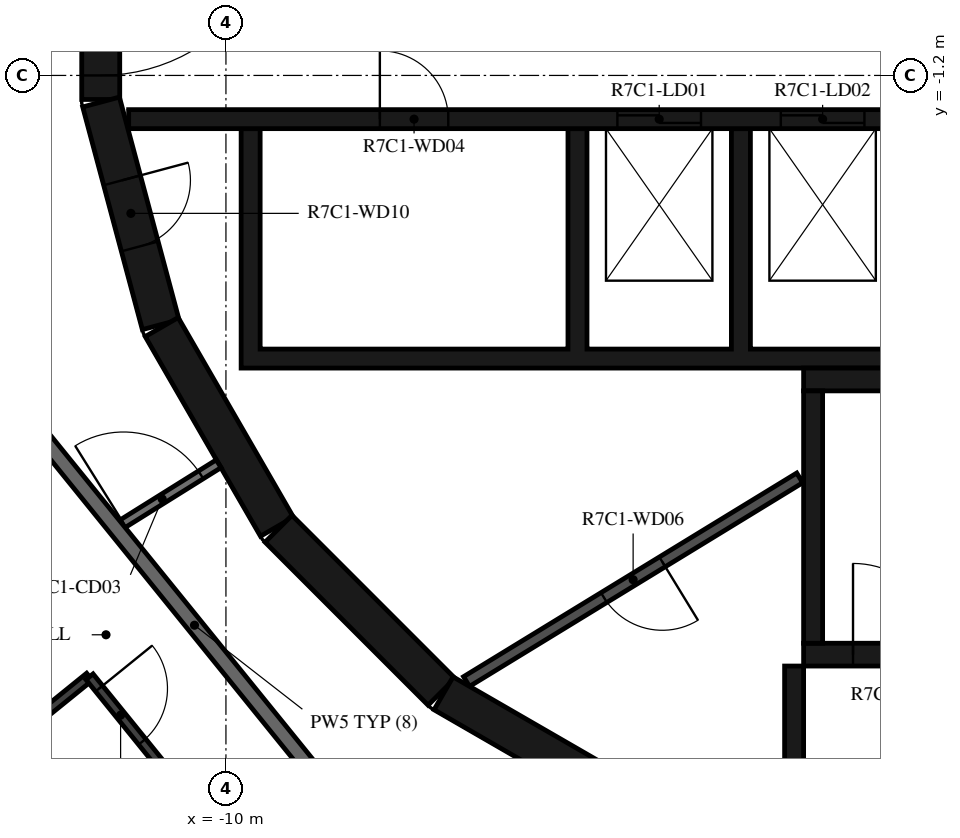
"""IFC4 building model, lengths in metres.
Left out: names, types, materials, properties, quantities, classifications, styles, units other than length and angle.
Written with IfcOpenShell. Run it as: python <this file> out.ifc"""

import sys

from ifc_helpers import new_model, si_unit, direction, frame, frame_2d, origin, place, context, subcontext, project, spatial, polyline, rectangle, outline, extrude, element, fill, save


model = new_model("IFC4")
c1 = context("Model", 3, precision=1e-05, world=origin(), true_north=direction((0.0, 1.0)))
c2 = subcontext(c1, "Body", "Model", "MODEL_VIEW")
j1 = project(units=[si_unit("LENGTHUNIT", "METRE"), si_unit("PLANEANGLEUNIT", "RADIAN")], contexts=[c1])
p1 = place(None, origin())
s1 = spatial("IfcSite", under=j1, at=p1, CompositionType="ELEMENT")
p2 = place(p1, origin())
s2 = spatial("IfcBuilding", under=s1, at=p2, CompositionType="ELEMENT")
p3 = place(p2, frame((0.0, 0.0, 287.9)))
s3 = spatial("IfcBuildingStorey", under=s2, at=p3, CompositionType="ELEMENT", Elevation=287.9)
p4 = place(p3, frame((-11.647, 1.516, 0.0), z_axis=(0.0, 0.0, 1.0), x_axis=(0.0, -1.0, 0.0)))
e1 = element("IfcWall", 1, at=p4, inside=s3, PredefinedType="SHEAR", context=c2, shape_type="SweptSolid", body=[
    extrude(rectangle(XDim=3.033, YDim=0.5, at=frame_2d((1.516, 0.0))), origin(), (0.0, 0.0, 1.0), 3.05),
])
p5 = place(p4, frame((0.316, 0.0, 0.0)))
e2 = element("IfcOpeningElement", 2, at=p5, cuts=e1, PredefinedType="OPENING", context=c2, shape_type="SweptSolid", body=[
    extrude(rectangle(XDim=2.4, YDim=2.1, at=frame_2d((1.2, 1.05))), frame((0.0, 0.26, 0.0), z_axis=(0.0, -1.0, 0.0), x_axis=(1.0, 0.0, 0.0)), (0.0, 0.0, 1.0), 0.52),
])
p6 = place(p3, frame((-11.643, -1.55, 0.0), z_axis=(0.0, 0.0, 1.0), x_axis=(0.258734743916, -0.965948410781, 0.0)))
e3 = element("IfcWall", 3, at=p6, inside=s3, PredefinedType="SHEAR", context=c2, shape_type="SweptSolid", body=[
    extrude(rectangle(XDim=3.033, YDim=0.5, at=frame_2d((1.516, 0.0))), origin(), (0.0, 0.0, 1.0), 3.05),
])
p7 = place(p6, frame((1.066, 0.0, 0.0)))
e4 = element("IfcOpeningElement", 4, at=p7, cuts=e3, PredefinedType="OPENING", context=c2, shape_type="SweptSolid", body=[
    extrude(rectangle(XDim=0.9, YDim=2.1, at=frame_2d((0.45, 1.05))), frame((0.0, 0.26, 0.0), z_axis=(0.0, -1.0, 0.0), x_axis=(1.0, 0.0, 0.0)), (0.0, 0.0, 1.0), 0.52),
])
p8 = place(p3, frame((-10.845, -4.51, 0.0), z_axis=(0.0, 0.0, 1.0), x_axis=(0.500087131594, -0.865975092491, 0.0)))
e5 = element("IfcWall", 5, at=p8, inside=s3, PredefinedType="SHEAR", context=c2, shape_type="SweptSolid", body=[
    extrude(rectangle(XDim=3.033, YDim=0.5, at=frame_2d((1.516, 0.0))), origin(), (0.0, 0.0, 1.0), 3.05),
])
p9 = place(p3, frame((-9.308, -7.164, 0.0), z_axis=(0.0, 0.0, 1.0), x_axis=(0.707106781187, -0.707106781187, 0.0)))
e6 = element("IfcWall", 6, at=p9, inside=s3, PredefinedType="SHEAR", context=c2, shape_type="SweptSolid", body=[
    extrude(rectangle(XDim=3.032, YDim=0.5, at=frame_2d((1.516, 0.0))), origin(), (0.0, 0.0, 1.0), 3.05),
])
p10 = place(p3, frame((-7.137, -9.329, 0.0), z_axis=(0.0, 0.0, 1.0), x_axis=(0.865975092491, -0.500087131594, 0.0)))
e7 = element("IfcWall", 7, at=p10, inside=s3, PredefinedType="SHEAR", context=c2, shape_type="SweptSolid", body=[
    extrude(rectangle(XDim=3.033, YDim=0.5, at=frame_2d((1.516, 0.0))), origin(), (0.0, 0.0, 1.0), 3.05),
])
p11 = place(p3, frame((-2.275, -8.67, 0.0), z_axis=(0.0, 0.0, 1.0), x_axis=(0.0, 1.0, 0.0)))
e8 = element("IfcWall", 8, at=p11, inside=s3, PredefinedType="SHEAR", context=c2, shape_type="SweptSolid", body=[
    extrude(rectangle(XDim=3.32, YDim=0.25, at=frame_2d((1.66, 0.0))), origin(), (0.0, 0.0, 1.0), 3.05),
])
p12 = place(p3, frame((-2.4, -5.2, 0.0), z_axis=(0.0, 0.0, 1.0), x_axis=(1.0, 0.0, 0.0)))
e9 = element("IfcWall", 9, at=p12, inside=s3, PredefinedType="SHEAR", context=c2, shape_type="SweptSolid", body=[
    extrude(rectangle(XDim=7.05, YDim=0.3, at=frame_2d((3.525, 0.0))), origin(), (0.0, 0.0, 1.0), 3.05),
])
p13 = place(p3, frame((-2.4, -8.82, 0.0), z_axis=(0.0, 0.0, 1.0), x_axis=(1.0, 0.0, 0.0)))
e10 = element("IfcWall", 10, at=p13, inside=s3, PredefinedType="SHEAR", context=c2, shape_type="SweptSolid", body=[
    extrude(rectangle(XDim=2.5, YDim=0.3, at=frame_2d((1.25, 0.0))), origin(), (0.0, 0.0, 1.0), 3.05),
])
p14 = place(p13, frame((0.65, 0.0, 0.0)))
e11 = element("IfcOpeningElement", 11, at=p14, cuts=e10, PredefinedType="OPENING", context=c2, shape_type="SweptSolid", body=[
    extrude(rectangle(XDim=1.2, YDim=2.1, at=frame_2d((0.6, 1.05))), frame((0.0, 0.16, 0.0), z_axis=(0.0, -1.0, 0.0), x_axis=(1.0, 0.0, 0.0)), (0.0, 0.0, 1.0), 0.32),
])
p15 = place(p3, frame((-2.525, -8.97, 0.0), z_axis=(0.0, 0.0, 1.0), x_axis=(0.0, -1.0, 0.0)))
e12 = element("IfcWall", 12, at=p15, inside=s3, PredefinedType="SHEAR", context=c2, shape_type="SweptSolid", body=[
    extrude(rectangle(XDim=2.11, YDim=0.25, at=frame_2d((1.055, 0.0))), origin(), (0.0, 0.0, 1.0), 3.05),
])
p16 = place(p3, origin())
e13 = element("IfcWall", 13, at=p16, inside=s3, PredefinedType="SHEAR", context=c2, shape_type="SweptSolid", body=[
    extrude(outline(polyline([(9.8, -5.05), (9.8, -4.8), (9.8, -1.9), (9.55, -1.9), (9.55, -4.8), (7.65, -4.8), (7.65, -1.9), (7.4, -1.9), (7.4, -4.8), (5.5, -4.8), (5.5, -1.9), (5.25, -1.9), (5.25, -4.8), (3.35, -4.8), (3.35, -1.9), (3.1, -1.9), (3.1, -4.8), (1.2, -4.8), (1.2, -1.9), (0.95, -1.9), (0.95, -4.8), (-0.95, -4.8), (-0.95, -1.9), (-1.2, -1.9), (-1.2, -4.8), (-3.1, -4.8), (-3.1, -1.9), (-3.35, -1.9), (-3.35, -4.8), (-5.25, -4.8), (-5.25, -1.9), (-5.5, -1.9), (-5.5, -4.8), (-9.55, -4.8), (-9.55, -1.9), (-9.8, -1.9), (-9.8, -4.8), (-9.8, -5.05), (9.8, -5.05)])), origin(), (0.0, 0.0, 1.0), 3.05),
])
p17 = place(p3, frame((-11.28, -1.775, 0.0), z_axis=(0.0, 0.0, 1.0), x_axis=(1.0, 0.0, 0.0)))
e14 = element("IfcWall", 14, at=p17, inside=s3, PredefinedType="SHEAR", context=c2, shape_type="SweptSolid", body=[
    extrude(rectangle(XDim=14.38, YDim=0.25, at=frame_2d((7.19, 0.0))), origin(), (0.0, 0.0, 1.0), 3.05),
])
p18 = place(p17, frame((6.43, 0.0, 0.0)))
e15 = element("IfcOpeningElement", 15, at=p18, cuts=e14, PredefinedType="OPENING", context=c2, shape_type="SweptSolid", body=[
    extrude(rectangle(XDim=1.1, YDim=2.1, at=frame_2d((0.55, 1.05))), frame((0.0, 0.135, 0.0), z_axis=(0.0, -1.0, 0.0), x_axis=(1.0, 0.0, 0.0)), (0.0, 0.0, 1.0), 0.27),
])
p19 = place(p17, frame((8.58, 0.0, 0.0)))
e16 = element("IfcOpeningElement", 16, at=p19, cuts=e14, PredefinedType="OPENING", context=c2, shape_type="SweptSolid", body=[
    extrude(rectangle(XDim=1.1, YDim=2.1, at=frame_2d((0.55, 1.05))), frame((0.0, 0.135, 0.0), z_axis=(0.0, -1.0, 0.0), x_axis=(1.0, 0.0, 0.0)), (0.0, 0.0, 1.0), 0.27),
])
p20 = place(p17, frame((10.73, 0.0, 0.0)))
e17 = element("IfcOpeningElement", 17, at=p20, cuts=e14, PredefinedType="OPENING", context=c2, shape_type="SweptSolid", body=[
    extrude(rectangle(XDim=1.1, YDim=2.1, at=frame_2d((0.55, 1.05))), frame((0.0, 0.135, 0.0), z_axis=(0.0, -1.0, 0.0), x_axis=(1.0, 0.0, 0.0)), (0.0, 0.0, 1.0), 0.27),
])
p21 = place(p17, frame((3.305, 0.0, 0.0)))
e18 = element("IfcOpeningElement", 18, at=p21, cuts=e14, PredefinedType="OPENING", context=c2, shape_type="SweptSolid", body=[
    extrude(rectangle(XDim=0.9, YDim=2.1, at=frame_2d((0.45, 1.05))), frame((0.0, 0.135, 0.0), z_axis=(0.0, -1.0, 0.0), x_axis=(1.0, 0.0, 0.0)), (0.0, 0.0, 1.0), 0.27),
])
p22 = place(p17, frame((12.98, 0.0, 0.0)))
e19 = element("IfcOpeningElement", 19, at=p22, cuts=e14, PredefinedType="OPENING", context=c2, shape_type="SweptSolid", body=[
    extrude(rectangle(XDim=0.9, YDim=2.1, at=frame_2d((0.45, 1.05))), frame((0.0, 0.135, 0.0), z_axis=(0.0, -1.0, 0.0), x_axis=(1.0, 0.0, 0.0)), (0.0, 0.0, 1.0), 0.27),
])
p23 = place(p3, frame((-2.451, -6.495, 0.0), z_axis=(0.0, 0.0, 1.0), x_axis=(-0.853250115418, -0.521501908471, 0.0)))
e20 = element("IfcWall", 20, at=p23, inside=s3, PredefinedType="PARTITIONING", context=c2, shape_type="SweptSolid", body=[
    extrude(rectangle(XDim=5.137, YDim=0.15, at=frame_2d((2.569, 0.0))), origin(), (0.0, 0.0, 1.0), 3.05),
])
p24 = place(p23, frame((2.119, 0.0, 0.0)))
e21 = element("IfcOpeningElement", 21, at=p24, cuts=e20, PredefinedType="OPENING", context=c2, shape_type="SweptSolid", body=[
    extrude(rectangle(XDim=0.9, YDim=2.1, at=frame_2d((0.45, 1.05))), frame((0.0, 0.085, 0.0), z_axis=(0.0, -1.0, 0.0), x_axis=(1.0, 0.0, 0.0)), (0.0, 0.0, 1.0), 0.17),
])
p25 = place(p3, frame((-11.449, -7.154, 0.0), z_axis=(0.0, 0.0, 1.0), x_axis=(0.848067047543, 0.529888934468, 0.0)))
e22 = element("IfcWall", 22, at=p25, inside=s3, PredefinedType="PARTITIONING", context=c2, shape_type="SweptSolid", body=[
    extrude(rectangle(XDim=1.596, YDim=0.12, at=frame_2d((0.798, 0.0))), origin(), (0.0, 0.0, 1.0), 3.05),
])
p26 = place(p25, frame((0.12, 0.0, 0.0)))
e23 = element("IfcOpeningElement", 23, at=p26, cuts=e22, PredefinedType="OPENING", context=c2, shape_type="SweptSolid", body=[
    extrude(rectangle(XDim=1.2, YDim=2.1, at=frame_2d((0.6, 1.05))), frame((0.0, 0.07, 0.0), z_axis=(0.0, -1.0, 0.0), x_axis=(1.0, 0.0, 0.0)), (0.0, 0.0, 1.0), 0.14),
])
p27 = place(p3, frame((-12.673, -5.643, 0.0), z_axis=(0.0, 0.0, 1.0), x_axis=(0.629302871585, -0.777160148113, 0.0)))
e24 = element("IfcWall", 24, at=p27, inside=s3, PredefinedType="STANDARD", context=c2, shape_type="SweptSolid", body=[
    extrude(rectangle(XDim=7.181, YDim=0.2, at=frame_2d((3.59, 0.0))), origin(), (0.0, 0.0, 1.0), 3.05),
])
p28 = place(p3, frame((-12.33, -9.544, 0.0), z_axis=(0.0, 0.0, 1.0), x_axis=(0.777046524115, 0.629443166109, 0.0)))
e25 = element("IfcWall", 25, at=p28, inside=s3, PredefinedType="PARTITIONING", context=c2, shape_type="SweptSolid", body=[
    extrude(rectangle(XDim=0.688, YDim=0.12, at=frame_2d((0.344, 0.0))), origin(), (0.0, 0.0, 1.0), 3.05),
])
p29 = place(p3, frame((-11.795, -9.111, 0.0), z_axis=(0.0, 0.0, 1.0), x_axis=(0.62936834401, -0.777107127466, 0.0)))
e26 = element("IfcWall", 26, at=p29, inside=s3, PredefinedType="PARTITIONING", context=c2, shape_type="SweptSolid", body=[
    extrude(rectangle(XDim=4.334, YDim=0.12, at=frame_2d((2.167, 0.0))), origin(), (0.0, 0.0, 1.0), 3.05),
])
p30 = place(p29, frame((0.2, 0.0, 0.0)))
e27 = element("IfcOpeningElement", 27, at=p30, cuts=e26, PredefinedType="OPENING", context=c2, shape_type="SweptSolid", body=[
    extrude(rectangle(XDim=0.9, YDim=2.1, at=frame_2d((0.45, 1.05))), frame((0.0, 0.07, 0.0), z_axis=(0.0, -1.0, 0.0), x_axis=(1.0, 0.0, 0.0)), (0.0, 0.0, 1.0), 0.14),
])
p31 = place(p3, frame((-11.185, -18.213, 0.0), z_axis=(0.0, 0.0, 1.0), x_axis=(-0.15642108221, 0.987690460134, 0.0)))
e28 = element("IfcWall", 28, at=p31, inside=s3, PredefinedType="PARTITIONING", context=c2, shape_type="SweptSolid", body=[
    extrude(rectangle(XDim=9.132, YDim=0.12, at=frame_2d((4.566, 0.0))), origin(), (0.0, 0.0, 1.0), 3.05),
])
p32 = place(p31, frame((1.781, 0.0, 0.0)))
e29 = element("IfcOpeningElement", 29, at=p32, cuts=e28, PredefinedType="OPENING", context=c2, shape_type="SweptSolid", body=[
    extrude(rectangle(XDim=0.9, YDim=2.1, at=frame_2d((0.45, 1.05))), frame((0.0, 0.07, 0.0), z_axis=(0.0, -1.0, 0.0), x_axis=(1.0, 0.0, 0.0)), (0.0, 0.0, 1.0), 0.14),
])
p33 = place(p14, origin())
e30 = element("IfcDoor", 30, at=p33, inside=s3, OperationType="SINGLE_SWING_LEFT", PredefinedType="DOOR", context=c2, shape_type="SweptSolid", body=[
    extrude(rectangle(XDim=1.2, YDim=2.1, at=frame_2d((0.6, 1.05))), frame((0.0, 0.025, 0.0), z_axis=(0.0, -1.0, 0.0), x_axis=(1.0, 0.0, 0.0)), (0.0, 0.0, 1.0), 0.05),
])
fill(e11, e30)
p34 = place(p5, origin())
e31 = element("IfcDoor", 31, at=p34, inside=s3, OperationType="DOUBLE_DOOR_SINGLE_SWING", PredefinedType="DOOR", context=c2, shape_type="SweptSolid", body=[
    extrude(rectangle(XDim=2.4, YDim=2.1, at=frame_2d((1.2, 1.05))), frame((0.0, 0.025, 0.0), z_axis=(0.0, -1.0, 0.0), x_axis=(1.0, 0.0, 0.0)), (0.0, 0.0, 1.0), 0.05),
])
fill(e2, e31)
p35 = place(p18, origin())
e32 = element("IfcDoor", 32, at=p35, inside=s3, OperationType="DOUBLE_DOOR_SLIDING", PredefinedType="DOOR", context=c2, shape_type="SweptSolid", body=[
    extrude(rectangle(XDim=1.1, YDim=2.1, at=frame_2d((0.55, 1.05))), frame((0.0, 0.025, 0.0), z_axis=(0.0, -1.0, 0.0), x_axis=(1.0, 0.0, 0.0)), (0.0, 0.0, 1.0), 0.05),
])
fill(e15, e32)
p36 = place(p19, origin())
e33 = element("IfcDoor", 33, at=p36, inside=s3, OperationType="DOUBLE_DOOR_SLIDING", PredefinedType="DOOR", context=c2, shape_type="SweptSolid", body=[
    extrude(rectangle(XDim=1.1, YDim=2.1, at=frame_2d((0.55, 1.05))), frame((0.0, 0.025, 0.0), z_axis=(0.0, -1.0, 0.0), x_axis=(1.0, 0.0, 0.0)), (0.0, 0.0, 1.0), 0.05),
])
fill(e16, e33)
p37 = place(p21, origin())
e34 = element("IfcDoor", 34, at=p37, inside=s3, OperationType="SINGLE_SWING_RIGHT", PredefinedType="DOOR", context=c2, shape_type="SweptSolid", body=[
    extrude(rectangle(XDim=0.9, YDim=2.1, at=frame_2d((0.45, 1.05))), frame((0.0, 0.025, 0.0), z_axis=(0.0, -1.0, 0.0), x_axis=(1.0, 0.0, 0.0)), (0.0, 0.0, 1.0), 0.05),
])
fill(e18, e34)
p38 = place(p24, origin())
e35 = element("IfcDoor", 35, at=p38, inside=s3, OperationType="SINGLE_SWING_RIGHT", PredefinedType="DOOR", context=c2, shape_type="SweptSolid", body=[
    extrude(rectangle(XDim=0.9, YDim=2.1, at=frame_2d((0.45, 1.05))), frame((0.0, 0.025, 0.0), z_axis=(0.0, -1.0, 0.0), x_axis=(1.0, 0.0, 0.0)), (0.0, 0.0, 1.0), 0.05),
])
fill(e21, e35)
p39 = place(p7, origin())
e36 = element("IfcDoor", 36, at=p39, inside=s3, OperationType="SINGLE_SWING_RIGHT", PredefinedType="DOOR", context=c2, shape_type="SweptSolid", body=[
    extrude(rectangle(XDim=0.9, YDim=2.1, at=frame_2d((0.45, 1.05))), frame((0.0, 0.025, 0.0), z_axis=(0.0, -1.0, 0.0), x_axis=(1.0, 0.0, 0.0)), (0.0, 0.0, 1.0), 0.05),
])
fill(e4, e36)
p40 = place(p30, origin())
e37 = element("IfcDoor", 37, at=p40, inside=s3, OperationType="SINGLE_SWING_RIGHT", PredefinedType="DOOR", context=c2, shape_type="SweptSolid", body=[
    extrude(rectangle(XDim=0.9, YDim=2.1, at=frame_2d((0.45, 1.05))), frame((0.0, 0.025, 0.0), z_axis=(0.0, -1.0, 0.0), x_axis=(1.0, 0.0, 0.0)), (0.0, 0.0, 1.0), 0.05),
])
fill(e27, e37)
p41 = place(p26, origin())
e38 = element("IfcDoor", 38, at=p41, inside=s3, OperationType="DOUBLE_DOOR_SINGLE_SWING", PredefinedType="DOOR", context=c2, shape_type="SweptSolid", body=[
    extrude(rectangle(XDim=1.2, YDim=2.1, at=frame_2d((0.6, 1.05))), frame((0.0, 0.025, 0.0), z_axis=(0.0, -1.0, 0.0), x_axis=(1.0, 0.0, 0.0)), (0.0, 0.0, 1.0), 0.05),
])
fill(e23, e38)
save(model, sys.argv[1])
